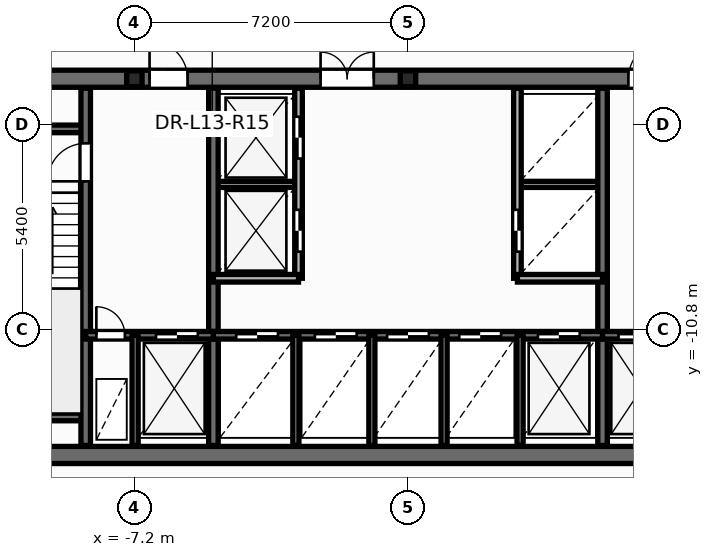
"""IFC4 building model, lengths in metres.
Left out: names, types, materials, properties, quantities, classifications, styles, units other than length and angle.
Written with IfcOpenShell. Run it as: python <this file> out.ifc"""

import sys

from ifc_helpers import new_model, si_unit, direction, frame, frame_2d, origin, origin_2d, place, context, subcontext, project, spatial, rectangle, i_section, extrude, element, fill, save


model = new_model("IFC4")
c1 = context("Model", 3, precision=1e-05, world=origin(), true_north=direction((0.0, 1.0)))
c2 = subcontext(c1, "Body", "Model", "MODEL_VIEW")
j1 = project(units=[si_unit("LENGTHUNIT", "METRE"), si_unit("PLANEANGLEUNIT", "RADIAN")], contexts=[c1])
p1 = place(None, origin())
s1 = spatial("IfcSite", under=j1, at=p1, CompositionType="ELEMENT")
p2 = place(p1, origin())
s2 = spatial("IfcBuilding", under=s1, at=p2, CompositionType="ELEMENT")
p3 = place(p2, frame((0.0, 0.0, 53.1)))
s3 = spatial("IfcBuildingStorey", under=s2, at=p3, CompositionType="ELEMENT", Elevation=53.1)
for number, where, z_axis, x_axis in (
    (1, (-7.2, -4.2, 0.0), (0.0, 0.0, 1.0), (1.0, 0.0, 0.0)),
    (2, (0.0, -4.2, 0.0), (0.0, 0.0, 1.0), (1.0, 0.0, 0.0)),
):
    element("IfcColumn", number, at=place(p3, frame(where, z_axis=z_axis, x_axis=x_axis)), inside=s3, PredefinedType="PILASTER", context=c2, shape_type="SweptSolid", body=[
        extrude(i_section(OverallWidth=0.405, OverallDepth=0.414, WebThickness=0.022, FlangeThickness=0.032, at=origin_2d()), origin(), (0.0, 0.0, 1.0), 3.6),
    ])
for number, where, z_axis, x_axis in (
    (3, (-5.12, -6.98, 0.0), (0.0, 0.0, 1.0), (1.0, 0.0, 0.0)),
    (4, (2.88, -6.98, 0.0), (0.0, 0.0, 1.0), (1.0, 0.0, 0.0)),
):
    element("IfcWall", number, at=place(p3, frame(where, z_axis=z_axis, x_axis=x_axis)), inside=s3, PredefinedType="PARTITIONING", context=c2, shape_type="SweptSolid", body=[
        extrude(rectangle(XDim=2.24, YDim=0.16, at=frame_2d((1.12, 0.0))), origin(), (0.0, 0.0, 1.0), 3.35),
    ])
p4 = place(p3, frame((-12.65, -14.1, 0.0), z_axis=(0.0, 0.0, 1.0), x_axis=(1.0, 0.0, 0.0)))
e5 = element("IfcWall", 5, at=p4, inside=s3, PredefinedType="SHEAR", context=c2, shape_type="SweptSolid", body=[
    extrude(rectangle(XDim=25.3, YDim=0.45, at=frame_2d((12.65, 0.0))), origin(), (0.0, 0.0, 1.0), 3.6),
])
p5 = place(p3, frame((-12.65, -4.2, 0.0), z_axis=(0.0, 0.0, 1.0), x_axis=(1.0, 0.0, 0.0)))
e6 = element("IfcWall", 6, at=p5, inside=s3, PredefinedType="SHEAR", context=c2, shape_type="SweptSolid", body=[
    extrude(rectangle(XDim=25.3, YDim=0.45, at=frame_2d((12.65, 0.0))), origin(), (0.0, 0.0, 1.0), 3.6),
])
p6 = place(p5, frame((1.85, 0.0, 0.0)))
e7 = element("IfcOpeningElement", 7, at=p6, cuts=e6, PredefinedType="OPENING", context=c2, shape_type="SweptSolid", body=[
    extrude(rectangle(XDim=0.756, YDim=2.054, at=frame_2d((0.375, 1.027))), frame((0.0, 0.235, 0.0), z_axis=(0.0, -1.0, 0.0), x_axis=(1.0, 0.0, 0.0)), (0.0, 0.0, 1.0), 0.47),
])
p7 = place(p5, frame((21.85, 0.0, 0.0)))
e8 = element("IfcOpeningElement", 8, at=p7, cuts=e6, PredefinedType="OPENING", context=c2, shape_type="SweptSolid", body=[
    extrude(rectangle(XDim=0.756, YDim=2.054, at=frame_2d((0.375, 1.027))), frame((0.0, 0.235, 0.0), z_axis=(0.0, -1.0, 0.0), x_axis=(1.0, 0.0, 0.0)), (0.0, 0.0, 1.0), 0.47),
])
p8 = place(p5, frame((23.5, 0.0, 0.0)))
e9 = element("IfcOpeningElement", 9, at=p8, cuts=e6, PredefinedType="OPENING", context=c2, shape_type="SweptSolid", body=[
    extrude(rectangle(XDim=0.756, YDim=2.054, at=frame_2d((0.375, 1.027))), frame((0.0, 0.235, 0.0), z_axis=(0.0, -1.0, 0.0), x_axis=(1.0, 0.0, 0.0)), (0.0, 0.0, 1.0), 0.47),
])
p9 = place(p5, frame((5.85, 0.0, 0.0)))
e10 = element("IfcOpeningElement", 10, at=p9, cuts=e6, PredefinedType="OPENING", context=c2, shape_type="SweptSolid", body=[
    extrude(rectangle(XDim=1.006, YDim=2.104, at=frame_2d((0.5, 1.052))), frame((0.0, 0.235, 0.0), z_axis=(0.0, -1.0, 0.0), x_axis=(1.0, 0.0, 0.0)), (0.0, 0.0, 1.0), 0.47),
])
p10 = place(p5, frame((10.35, 0.0, 0.0)))
e11 = element("IfcOpeningElement", 11, at=p10, cuts=e6, PredefinedType="OPENING", context=c2, shape_type="SweptSolid", body=[
    extrude(rectangle(XDim=1.406, YDim=2.154, at=frame_2d((0.7, 1.077))), frame((0.0, 0.235, 0.0), z_axis=(0.0, -1.0, 0.0), x_axis=(1.0, 0.0, 0.0)), (0.0, 0.0, 1.0), 0.47),
])
p11 = place(p5, frame((18.45, 0.0, 0.0)))
e12 = element("IfcOpeningElement", 12, at=p11, cuts=e6, PredefinedType="OPENING", context=c2, shape_type="SweptSolid", body=[
    extrude(rectangle(XDim=1.006, YDim=2.104, at=frame_2d((0.5, 1.052))), frame((0.0, 0.235, 0.0), z_axis=(0.0, -1.0, 0.0), x_axis=(1.0, 0.0, 0.0)), (0.0, 0.0, 1.0), 0.47),
])
for number, where, z_axis, x_axis in (
    (13, (-12.35, -5.52, 0.0), (0.0, 0.0, 1.0), (1.0, 0.0, 0.0)),
    (14, (-12.35, -13.1, 0.0), (0.0, 0.0, 1.0), (1.0, 0.0, 0.0)),
):
    element("IfcWall", number, at=place(p3, frame(where, z_axis=z_axis, x_axis=x_axis)), inside=s3, PredefinedType="SOLIDWALL", context=c2, shape_type="SweptSolid", body=[
        extrude(rectangle(XDim=3.87, YDim=0.2, at=frame_2d((1.935, 0.0))), origin(), (0.0, 0.0, 1.0), 3.6),
    ])
p12 = place(p3, frame((-8.48, -13.85, 0.0), z_axis=(0.0, 0.0, 1.0), x_axis=(0.0, 1.0, 0.0)))
e15 = element("IfcWall", 15, at=p12, inside=s3, PredefinedType="SHEAR", context=c2, shape_type="SweptSolid", body=[
    extrude(rectangle(XDim=9.4, YDim=0.25, at=frame_2d((4.7, 0.0))), origin(), (0.0, 0.0, 1.0), 3.6),
])
p13 = place(p12, frame((6.95, 0.0, 0.0)))
e16 = element("IfcOpeningElement", 16, at=p13, cuts=e15, PredefinedType="OPENING", context=c2, shape_type="SweptSolid", body=[
    extrude(rectangle(XDim=1.006, YDim=2.104, at=frame_2d((0.5, 1.052))), frame((0.0, 0.135, 0.0), z_axis=(0.0, -1.0, 0.0), x_axis=(1.0, 0.0, 0.0)), (0.0, 0.0, 1.0), 0.27),
])
for number, where, z_axis, x_axis in (
    (17, (-5.12, -13.85, 0.0), (0.0, 0.0, 1.0), (0.0, 1.0, 0.0)),
    (18, (5.12, -13.85, 0.0), (0.0, 0.0, 1.0), (0.0, 1.0, 0.0)),
):
    element("IfcWall", number, at=place(p3, frame(where, z_axis=z_axis, x_axis=x_axis)), inside=s3, PredefinedType="SHEAR", context=c2, shape_type="SweptSolid", body=[
        extrude(rectangle(XDim=9.4, YDim=0.25, at=frame_2d((4.7, 0.0))), origin(), (0.0, 0.0, 1.0), 3.6),
    ])
p14 = place(p3, frame((-8.48, -10.95, 0.0), z_axis=(0.0, 0.0, 1.0), x_axis=(1.0, 0.0, 0.0)))
e19 = element("IfcWall", 19, at=p14, inside=s3, PredefinedType="SOLIDWALL", context=c2, shape_type="SweptSolid", body=[
    extrude(rectangle(XDim=3.36, YDim=0.2, at=frame_2d((1.68, 0.0))), origin(), (0.0, 0.0, 1.0), 3.6),
])
p15 = place(p14, frame((0.28, 0.0, 0.0)))
e20 = element("IfcOpeningElement", 20, at=p15, cuts=e19, PredefinedType="OPENING", context=c2, shape_type="SweptSolid", body=[
    extrude(rectangle(XDim=0.756, YDim=2.054, at=frame_2d((0.375, 1.027))), frame((0.0, 0.11, 0.0), z_axis=(0.0, -1.0, 0.0), x_axis=(1.0, 0.0, 0.0)), (0.0, 0.0, 1.0), 0.22),
])
p16 = place(p14, frame((1.85, 0.0, 0.0)))
e21 = element("IfcOpeningElement", 21, at=p16, cuts=e19, PredefinedType="OPENING", context=c2, shape_type="SweptSolid", body=[
    extrude(rectangle(XDim=1.106, YDim=2.104, at=frame_2d((0.55, 1.052))), frame((0.0, 0.11, 0.0), z_axis=(0.0, -1.0, 0.0), x_axis=(1.0, 0.0, 0.0)), (0.0, 0.0, 1.0), 0.22),
])
p17 = place(p3, frame((-5.12, -10.95, 0.0), z_axis=(0.0, 0.0, 1.0), x_axis=(1.0, 0.0, 0.0)))
e22 = element("IfcWall", 22, at=p17, inside=s3, PredefinedType="SOLIDWALL", context=c2, shape_type="SweptSolid", body=[
    extrude(rectangle(XDim=10.24, YDim=0.2, at=frame_2d((5.12, 0.0))), origin(), (0.0, 0.0, 1.0), 3.6),
])
p18 = place(p17, frame((0.6, 0.0, 0.0)))
e23 = element("IfcOpeningElement", 23, at=p18, cuts=e22, PredefinedType="OPENING", context=c2, shape_type="SweptSolid", body=[
    extrude(rectangle(XDim=1.106, YDim=2.104, at=frame_2d((0.55, 1.052))), frame((0.0, 0.11, 0.0), z_axis=(0.0, -1.0, 0.0), x_axis=(1.0, 0.0, 0.0)), (0.0, 0.0, 1.0), 0.22),
])
p19 = place(p17, frame((2.67, 0.0, 0.0)))
e24 = element("IfcOpeningElement", 24, at=p19, cuts=e22, PredefinedType="OPENING", context=c2, shape_type="SweptSolid", body=[
    extrude(rectangle(XDim=1.106, YDim=2.104, at=frame_2d((0.55, 1.052))), frame((0.0, 0.11, 0.0), z_axis=(0.0, -1.0, 0.0), x_axis=(1.0, 0.0, 0.0)), (0.0, 0.0, 1.0), 0.22),
])
p20 = place(p17, frame((4.57, 0.0, 0.0)))
e25 = element("IfcOpeningElement", 25, at=p20, cuts=e22, PredefinedType="OPENING", context=c2, shape_type="SweptSolid", body=[
    extrude(rectangle(XDim=1.106, YDim=2.104, at=frame_2d((0.55, 1.052))), frame((0.0, 0.11, 0.0), z_axis=(0.0, -1.0, 0.0), x_axis=(1.0, 0.0, 0.0)), (0.0, 0.0, 1.0), 0.22),
])
p21 = place(p17, frame((6.47, 0.0, 0.0)))
e26 = element("IfcOpeningElement", 26, at=p21, cuts=e22, PredefinedType="OPENING", context=c2, shape_type="SweptSolid", body=[
    extrude(rectangle(XDim=1.106, YDim=2.104, at=frame_2d((0.55, 1.052))), frame((0.0, 0.11, 0.0), z_axis=(0.0, -1.0, 0.0), x_axis=(1.0, 0.0, 0.0)), (0.0, 0.0, 1.0), 0.22),
])
p22 = place(p17, frame((8.54, 0.0, 0.0)))
e27 = element("IfcOpeningElement", 27, at=p22, cuts=e22, PredefinedType="OPENING", context=c2, shape_type="SweptSolid", body=[
    extrude(rectangle(XDim=1.106, YDim=2.104, at=frame_2d((0.55, 1.052))), frame((0.0, 0.11, 0.0), z_axis=(0.0, -1.0, 0.0), x_axis=(1.0, 0.0, 0.0)), (0.0, 0.0, 1.0), 0.22),
])
p23 = place(p3, frame((5.12, -10.95, 0.0), z_axis=(0.0, 0.0, 1.0), x_axis=(1.0, 0.0, 0.0)))
e28 = element("IfcWall", 28, at=p23, inside=s3, PredefinedType="SOLIDWALL", context=c2, shape_type="SweptSolid", body=[
    extrude(rectangle(XDim=3.36, YDim=0.2, at=frame_2d((1.68, 0.0))), origin(), (0.0, 0.0, 1.0), 3.6),
])
p24 = place(p23, frame((0.42, 0.0, 0.0)))
e29 = element("IfcOpeningElement", 29, at=p24, cuts=e28, PredefinedType="OPENING", context=c2, shape_type="SweptSolid", body=[
    extrude(rectangle(XDim=1.106, YDim=2.104, at=frame_2d((0.55, 1.052))), frame((0.0, 0.11, 0.0), z_axis=(0.0, -1.0, 0.0), x_axis=(1.0, 0.0, 0.0)), (0.0, 0.0, 1.0), 0.22),
])
p25 = place(p23, frame((2.3, 0.0, 0.0)))
e30 = element("IfcOpeningElement", 30, at=p25, cuts=e28, PredefinedType="OPENING", context=c2, shape_type="SweptSolid", body=[
    extrude(rectangle(XDim=0.756, YDim=2.054, at=frame_2d((0.375, 1.027))), frame((0.0, 0.11, 0.0), z_axis=(0.0, -1.0, 0.0), x_axis=(1.0, 0.0, 0.0)), (0.0, 0.0, 1.0), 0.22),
])
for number, where, z_axis, x_axis in (
    (31, (-7.18, -13.85, 0.0), (0.0, 0.0, 1.0), (0.0, 1.0, 0.0)),
    (32, (-2.95, -13.85, 0.0), (0.0, 0.0, 1.0), (0.0, 1.0, 0.0)),
    (33, (2.95, -13.85, 0.0), (0.0, 0.0, 1.0), (0.0, 1.0, 0.0)),
):
    element("IfcWall", number, at=place(p3, frame(where, z_axis=z_axis, x_axis=x_axis)), inside=s3, PredefinedType="PARTITIONING", context=c2, shape_type="SweptSolid", body=[
        extrude(rectangle(XDim=2.9, YDim=0.16, at=frame_2d((1.45, 0.0))), origin(), (0.0, 0.0, 1.0), 2.375),
    ])
p26 = place(p3, frame((-2.88, -9.45, 0.0), z_axis=(0.0, 0.0, 1.0), x_axis=(0.0, 1.0, 0.0)))
e34 = element("IfcWall", 34, at=p26, inside=s3, PredefinedType="SOLIDWALL", context=c2, shape_type="SweptSolid", body=[
    extrude(rectangle(XDim=5.0, YDim=0.2, at=frame_2d((2.5, 0.0))), origin(), (0.0, 0.0, 1.0), 3.35),
])
p27 = place(p26, frame((0.7, 0.0, 0.0)))
e35 = element("IfcOpeningElement", 35, at=p27, cuts=e34, PredefinedType="OPENING", context=c2, shape_type="SweptSolid", body=[
    extrude(rectangle(XDim=1.106, YDim=2.104, at=frame_2d((0.55, 1.052))), frame((0.0, 0.11, 0.0), z_axis=(0.0, -1.0, 0.0), x_axis=(1.0, 0.0, 0.0)), (0.0, 0.0, 1.0), 0.22),
])
p28 = place(p26, frame((3.15, 0.0, 0.0)))
e36 = element("IfcOpeningElement", 36, at=p28, cuts=e34, PredefinedType="OPENING", context=c2, shape_type="SweptSolid", body=[
    extrude(rectangle(XDim=1.106, YDim=2.104, at=frame_2d((0.55, 1.052))), frame((0.0, 0.11, 0.0), z_axis=(0.0, -1.0, 0.0), x_axis=(1.0, 0.0, 0.0)), (0.0, 0.0, 1.0), 0.22),
])
p29 = place(p3, frame((-5.12, -9.45, 0.0), z_axis=(0.0, 0.0, 1.0), x_axis=(1.0, 0.0, 0.0)))
e37 = element("IfcWall", 37, at=p29, inside=s3, PredefinedType="SOLIDWALL", context=c2, shape_type="SweptSolid", body=[
    extrude(rectangle(XDim=2.24, YDim=0.2, at=frame_2d((1.12, 0.0))), origin(), (0.0, 0.0, 1.0), 3.35),
])
p30 = place(p3, frame((2.88, -9.45, 0.0), z_axis=(0.0, 0.0, 1.0), x_axis=(0.0, 1.0, 0.0)))
e38 = element("IfcWall", 38, at=p30, inside=s3, PredefinedType="SOLIDWALL", context=c2, shape_type="SweptSolid", body=[
    extrude(rectangle(XDim=5.0, YDim=0.2, at=frame_2d((2.5, 0.0))), origin(), (0.0, 0.0, 1.0), 3.35),
])
p31 = place(p30, frame((0.7, 0.0, 0.0)))
e39 = element("IfcOpeningElement", 39, at=p31, cuts=e38, PredefinedType="OPENING", context=c2, shape_type="SweptSolid", body=[
    extrude(rectangle(XDim=1.106, YDim=2.104, at=frame_2d((0.55, 1.052))), frame((0.0, 0.11, 0.0), z_axis=(0.0, -1.0, 0.0), x_axis=(1.0, 0.0, 0.0)), (0.0, 0.0, 1.0), 0.22),
])
p32 = place(p3, frame((2.88, -9.45, 0.0), z_axis=(0.0, 0.0, 1.0), x_axis=(1.0, 0.0, 0.0)))
e40 = element("IfcWall", 40, at=p32, inside=s3, PredefinedType="SOLIDWALL", context=c2, shape_type="SweptSolid", body=[
    extrude(rectangle(XDim=2.24, YDim=0.2, at=frame_2d((1.12, 0.0))), origin(), (0.0, 0.0, 1.0), 3.35),
])
for number, where, z_axis, x_axis in (
    (41, (-0.95, -13.85, 0.0), (0.0, 0.0, 1.0), (0.0, 1.0, 0.0)),
    (42, (0.95, -13.85, 0.0), (0.0, 0.0, 1.0), (0.0, 1.0, 0.0)),
):
    element("IfcWall", number, at=place(p3, frame(where, z_axis=z_axis, x_axis=x_axis)), inside=s3, PredefinedType="PARTITIONING", context=c2, shape_type="SweptSolid", body=[
        extrude(rectangle(XDim=2.9, YDim=0.16, at=frame_2d((1.45, 0.0))), origin(), (0.0, 0.0, 1.0), 2.375),
    ])
p33 = place(p27, origin())
e43 = element("IfcDoor", 43, at=p33, inside=s3, OperationType="DOUBLE_DOOR_SLIDING", PredefinedType="DOOR", context=c2, shape_type="SweptSolid", body=[
    extrude(rectangle(XDim=1.1, YDim=2.1, at=frame_2d((0.55, 1.05))), frame((0.0, 0.025, 0.0), z_axis=(0.0, -1.0, 0.0), x_axis=(1.0, 0.0, 0.0)), (0.0, 0.0, 1.0), 0.05),
])
fill(e35, e43)
p34 = place(p28, origin())
e44 = element("IfcDoor", 44, at=p34, inside=s3, OperationType="DOUBLE_DOOR_SLIDING", PredefinedType="DOOR", context=c2, shape_type="SweptSolid", body=[
    extrude(rectangle(XDim=1.1, YDim=2.1, at=frame_2d((0.55, 1.05))), frame((0.0, 0.025, 0.0), z_axis=(0.0, -1.0, 0.0), x_axis=(1.0, 0.0, 0.0)), (0.0, 0.0, 1.0), 0.05),
])
fill(e36, e44)
p35 = place(p31, origin())
e45 = element("IfcDoor", 45, at=p35, inside=s3, OperationType="DOUBLE_DOOR_SLIDING", PredefinedType="DOOR", context=c2, shape_type="SweptSolid", body=[
    extrude(rectangle(XDim=1.1, YDim=2.1, at=frame_2d((0.55, 1.05))), frame((0.0, 0.025, 0.0), z_axis=(0.0, -1.0, 0.0), x_axis=(1.0, 0.0, 0.0)), (0.0, 0.0, 1.0), 0.05),
])
fill(e39, e45)
p36 = place(p13, origin())
e46 = element("IfcDoor", 46, at=p36, inside=s3, OperationType="SINGLE_SWING_LEFT", PredefinedType="DOOR", context=c2, shape_type="SweptSolid", body=[
    extrude(rectangle(XDim=1.0, YDim=2.1, at=frame_2d((0.5, 1.05))), frame((0.0, 0.025, 0.0), z_axis=(0.0, -1.0, 0.0), x_axis=(1.0, 0.0, 0.0)), (0.0, 0.0, 1.0), 0.05),
])
fill(e16, e46)
p37 = place(p15, origin())
e47 = element("IfcDoor", 47, at=p37, inside=s3, OperationType="SINGLE_SWING_LEFT", PredefinedType="DOOR", context=c2, shape_type="SweptSolid", body=[
    extrude(rectangle(XDim=0.75, YDim=2.05, at=frame_2d((0.375, 1.025))), frame((0.0, 0.025, 0.0), z_axis=(0.0, -1.0, 0.0), x_axis=(1.0, 0.0, 0.0)), (0.0, 0.0, 1.0), 0.05),
])
fill(e20, e47)
p38 = place(p16, origin())
e48 = element("IfcDoor", 48, at=p38, inside=s3, OperationType="DOUBLE_DOOR_SLIDING", PredefinedType="DOOR", context=c2, shape_type="SweptSolid", body=[
    extrude(rectangle(XDim=1.1, YDim=2.1, at=frame_2d((0.55, 1.05))), frame((0.0, 0.025, 0.0), z_axis=(0.0, -1.0, 0.0), x_axis=(1.0, 0.0, 0.0)), (0.0, 0.0, 1.0), 0.05),
])
fill(e21, e48)
p39 = place(p24, origin())
e49 = element("IfcDoor", 49, at=p39, inside=s3, OperationType="DOUBLE_DOOR_SLIDING", PredefinedType="DOOR", context=c2, shape_type="SweptSolid", body=[
    extrude(rectangle(XDim=1.1, YDim=2.1, at=frame_2d((0.55, 1.05))), frame((0.0, 0.025, 0.0), z_axis=(0.0, -1.0, 0.0), x_axis=(1.0, 0.0, 0.0)), (0.0, 0.0, 1.0), 0.05),
])
fill(e29, e49)
p40 = place(p18, origin())
e50 = element("IfcDoor", 50, at=p40, inside=s3, OperationType="DOUBLE_DOOR_SLIDING", PredefinedType="DOOR", context=c2, shape_type="SweptSolid", body=[
    extrude(rectangle(XDim=1.1, YDim=2.1, at=frame_2d((0.55, 1.05))), frame((0.0, 0.025, 0.0), z_axis=(0.0, -1.0, 0.0), x_axis=(1.0, 0.0, 0.0)), (0.0, 0.0, 1.0), 0.05),
])
fill(e23, e50)
p41 = place(p19, origin())
e51 = element("IfcDoor", 51, at=p41, inside=s3, OperationType="DOUBLE_DOOR_SLIDING", PredefinedType="DOOR", context=c2, shape_type="SweptSolid", body=[
    extrude(rectangle(XDim=1.1, YDim=2.1, at=frame_2d((0.55, 1.05))), frame((0.0, 0.025, 0.0), z_axis=(0.0, -1.0, 0.0), x_axis=(1.0, 0.0, 0.0)), (0.0, 0.0, 1.0), 0.05),
])
fill(e24, e51)
p42 = place(p20, origin())
e52 = element("IfcDoor", 52, at=p42, inside=s3, OperationType="DOUBLE_DOOR_SLIDING", PredefinedType="DOOR", context=c2, shape_type="SweptSolid", body=[
    extrude(rectangle(XDim=1.1, YDim=2.1, at=frame_2d((0.55, 1.05))), frame((0.0, 0.025, 0.0), z_axis=(0.0, -1.0, 0.0), x_axis=(1.0, 0.0, 0.0)), (0.0, 0.0, 1.0), 0.05),
])
fill(e25, e52)
p43 = place(p21, origin())
e53 = element("IfcDoor", 53, at=p43, inside=s3, OperationType="DOUBLE_DOOR_SLIDING", PredefinedType="DOOR", context=c2, shape_type="SweptSolid", body=[
    extrude(rectangle(XDim=1.1, YDim=2.1, at=frame_2d((0.55, 1.05))), frame((0.0, 0.025, 0.0), z_axis=(0.0, -1.0, 0.0), x_axis=(1.0, 0.0, 0.0)), (0.0, 0.0, 1.0), 0.05),
])
fill(e26, e53)
p44 = place(p22, origin())
e54 = element("IfcDoor", 54, at=p44, inside=s3, OperationType="DOUBLE_DOOR_SLIDING", PredefinedType="DOOR", context=c2, shape_type="SweptSolid", body=[
    extrude(rectangle(XDim=1.1, YDim=2.1, at=frame_2d((0.55, 1.05))), frame((0.0, 0.025, 0.0), z_axis=(0.0, -1.0, 0.0), x_axis=(1.0, 0.0, 0.0)), (0.0, 0.0, 1.0), 0.05),
])
fill(e27, e54)
p45 = place(p9, origin())
e55 = element("IfcDoor", 55, at=p45, inside=s3, OperationType="SINGLE_SWING_LEFT", PredefinedType="DOOR", context=c2, shape_type="SweptSolid", body=[
    extrude(rectangle(XDim=1.0, YDim=2.1, at=frame_2d((0.5, 1.05))), frame((0.0, 0.025, 0.0), z_axis=(0.0, -1.0, 0.0), x_axis=(1.0, 0.0, 0.0)), (0.0, 0.0, 1.0), 0.05),
])
fill(e10, e55)
p46 = place(p10, origin())
e56 = element("IfcDoor", 56, at=p46, inside=s3, OperationType="DOUBLE_DOOR_SINGLE_SWING", PredefinedType="DOOR", context=c2, shape_type="SweptSolid", body=[
    extrude(rectangle(XDim=1.4, YDim=2.15, at=frame_2d((0.7, 1.075))), frame((0.0, 0.025, 0.0), z_axis=(0.0, -1.0, 0.0), x_axis=(1.0, 0.0, 0.0)), (0.0, 0.0, 1.0), 0.05),
])
fill(e11, e56)
p47 = place(p11, origin())
e57 = element("IfcDoor", 57, at=p47, inside=s3, OperationType="SINGLE_SWING_RIGHT", PredefinedType="DOOR", context=c2, shape_type="SweptSolid", body=[
    extrude(rectangle(XDim=1.0, YDim=2.1, at=frame_2d((0.5, 1.05))), frame((0.0, 0.025, 0.0), z_axis=(0.0, -1.0, 0.0), x_axis=(1.0, 0.0, 0.0)), (0.0, 0.0, 1.0), 0.05),
])
fill(e12, e57)
save(model, sys.argv[1])
